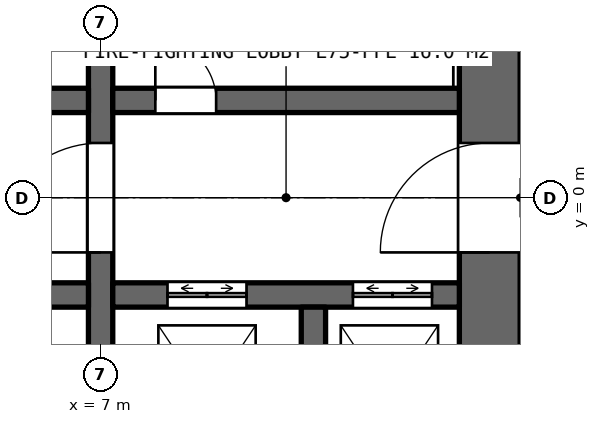
"""IFC4 building model, lengths in metres.
Left out: names, types, materials, properties, quantities, classifications, styles, units other than length and angle.
Written with IfcOpenShell. Run it as: python <this file> out.ifc"""

import sys

from ifc_helpers import new_model, si_unit, direction, frame, frame_2d, origin, place, context, subcontext, project, spatial, rectangle, extrude, element, fill, save


model = new_model("IFC4")
c1 = context("Model", 3, precision=1e-05, world=origin(), true_north=direction((0.0, 1.0)))
c2 = subcontext(c1, "Body", "Model", "MODEL_VIEW")
j1 = project(units=[si_unit("LENGTHUNIT", "METRE"), si_unit("PLANEANGLEUNIT", "RADIAN")], contexts=[c1])
p1 = place(None, origin())
s1 = spatial("IfcSite", under=j1, at=p1, CompositionType="ELEMENT")
p2 = place(p1, origin())
s2 = spatial("IfcBuilding", under=s1, at=p2, CompositionType="ELEMENT")
p3 = place(p2, frame((0.0, 0.0, 334.2)))
s3 = spatial("IfcBuildingStorey", under=s2, at=p3, CompositionType="ELEMENT", Elevation=334.2)
p4 = place(p3, frame((13.4, -8.9, 0.0), z_axis=(0.0, 0.0, 1.0), x_axis=(0.0, 1.0, 0.0)))
e1 = element("IfcWall", 1, at=p4, inside=s3, PredefinedType="SHEAR", context=c2, shape_type="SweptSolid", body=[
    extrude(rectangle(XDim=17.8, YDim=1.0, at=frame_2d((8.9, 0.0))), origin(), (0.0, 0.0, 1.0), 5.0),
])
p5 = place(p4, frame((8.0, 0.0, 0.0)))
e2 = element("IfcOpeningElement", 2, at=p5, cuts=e1, PredefinedType="OPENING", context=c2, shape_type="SweptSolid", body=[
    extrude(rectangle(XDim=1.8, YDim=2.4, at=frame_2d((0.9, 1.2))), frame((0.0, 0.51, 0.0), z_axis=(0.0, -1.0, 0.0), x_axis=(1.0, 0.0, 0.0)), (0.0, 0.0, 1.0), 1.02),
])
p6 = place(p3, frame((7.0, -8.9, 0.0), z_axis=(0.0, 0.0, 1.0), x_axis=(0.0, 1.0, 0.0)))
e3 = element("IfcWall", 3, at=p6, inside=s3, PredefinedType="SHEAR", context=c2, shape_type="SweptSolid", body=[
    extrude(rectangle(XDim=17.8, YDim=0.4, at=frame_2d((8.9, 0.0))), origin(), (0.0, 0.0, 1.0), 5.0),
])
p7 = place(p6, frame((8.0, 0.0, 0.0)))
e4 = element("IfcOpeningElement", 4, at=p7, cuts=e3, PredefinedType="OPENING", context=c2, shape_type="SweptSolid", body=[
    extrude(rectangle(XDim=1.8, YDim=2.4, at=frame_2d((0.9, 1.2))), frame((0.0, 0.21, 0.0), z_axis=(0.0, -1.0, 0.0), x_axis=(1.0, 0.0, 0.0)), (0.0, 0.0, 1.0), 0.42),
])
p8 = place(p3, frame((-6.8, 1.6, 0.0), z_axis=(0.0, 0.0, 1.0), x_axis=(1.0, 0.0, 0.0)))
e5 = element("IfcWall", 5, at=p8, inside=s3, PredefinedType="SHEAR", context=c2, shape_type="SweptSolid", body=[
    extrude(rectangle(XDim=13.6, YDim=0.4, at=frame_2d((6.8, 0.0))), origin(), (0.0, 0.0, 1.0), 5.0),
])
p9 = place(p8, frame((2.365, 0.0, 0.0)))
e6 = element("IfcOpeningElement", 6, at=p9, cuts=e5, PredefinedType="OPENING", context=c2, shape_type="SweptSolid", body=[
    extrude(rectangle(XDim=1.0, YDim=2.4, at=frame_2d((0.5, 1.2))), frame((0.0, 0.21, 0.0), z_axis=(0.0, -1.0, 0.0), x_axis=(1.0, 0.0, 0.0)), (0.0, 0.0, 1.0), 0.42),
])
p10 = place(p8, frame((7.835, 0.0, 0.0)))
e7 = element("IfcOpeningElement", 7, at=p10, cuts=e5, PredefinedType="OPENING", context=c2, shape_type="SweptSolid", body=[
    extrude(rectangle(XDim=1.0, YDim=2.4, at=frame_2d((0.5, 1.2))), frame((0.0, 0.21, 0.0), z_axis=(0.0, -1.0, 0.0), x_axis=(1.0, 0.0, 0.0)), (0.0, 0.0, 1.0), 0.42),
])
p11 = place(p8, frame((11.95, 0.0, 0.0)))
e8 = element("IfcOpeningElement", 8, at=p11, cuts=e5, PredefinedType="OPENING", context=c2, shape_type="SweptSolid", body=[
    extrude(rectangle(XDim=0.9, YDim=2.4, at=frame_2d((0.45, 1.2))), frame((0.0, 0.21, 0.0), z_axis=(0.0, -1.0, 0.0), x_axis=(1.0, 0.0, 0.0)), (0.0, 0.0, 1.0), 0.42),
])
p12 = place(p3, frame((-6.8, -1.6, 0.0), z_axis=(0.0, 0.0, 1.0), x_axis=(1.0, 0.0, 0.0)))
e9 = element("IfcWall", 9, at=p12, inside=s3, PredefinedType="SHEAR", context=c2, shape_type="SweptSolid", body=[
    extrude(rectangle(XDim=13.6, YDim=0.4, at=frame_2d((6.8, 0.0))), origin(), (0.0, 0.0, 1.0), 5.0),
])
p13 = place(p12, frame((11.95, 0.0, 0.0)))
e10 = element("IfcOpeningElement", 10, at=p13, cuts=e9, PredefinedType="OPENING", context=c2, shape_type="SweptSolid", body=[
    extrude(rectangle(XDim=0.9, YDim=2.4, at=frame_2d((0.45, 1.2))), frame((0.0, 0.21, 0.0), z_axis=(0.0, -1.0, 0.0), x_axis=(1.0, 0.0, 0.0)), (0.0, 0.0, 1.0), 0.42),
])
p14 = place(p12, frame((4.5, 0.0, 0.0)))
e11 = element("IfcOpeningElement", 11, at=p14, cuts=e9, PredefinedType="OPENING", context=c2, shape_type="SweptSolid", body=[
    extrude(rectangle(XDim=1.8, YDim=2.4, at=frame_2d((0.9, 1.2))), frame((0.0, 0.21, 0.0), z_axis=(0.0, -1.0, 0.0), x_axis=(1.0, 0.0, 0.0)), (0.0, 0.0, 1.0), 0.42),
])
p15 = place(p3, frame((7.2, 1.6, 0.0), z_axis=(0.0, 0.0, 1.0), x_axis=(1.0, 0.0, 0.0)))
e12 = element("IfcWall", 12, at=p15, inside=s3, PredefinedType="SHEAR", context=c2, shape_type="SweptSolid", body=[
    extrude(rectangle(XDim=5.7, YDim=0.4, at=frame_2d((2.85, 0.0))), origin(), (0.0, 0.0, 1.0), 5.0),
])
p16 = place(p15, frame((0.7, 0.0, 0.0)))
e13 = element("IfcOpeningElement", 13, at=p16, cuts=e12, PredefinedType="OPENING", context=c2, shape_type="SweptSolid", body=[
    extrude(rectangle(XDim=1.0, YDim=2.4, at=frame_2d((0.5, 1.2))), frame((0.0, 0.21, 0.0), z_axis=(0.0, -1.0, 0.0), x_axis=(1.0, 0.0, 0.0)), (0.0, 0.0, 1.0), 0.42),
])
p17 = place(p3, frame((7.2, -1.6, 0.0), z_axis=(0.0, 0.0, 1.0), x_axis=(1.0, 0.0, 0.0)))
e14 = element("IfcWall", 14, at=p17, inside=s3, PredefinedType="SHEAR", context=c2, shape_type="SweptSolid", body=[
    extrude(rectangle(XDim=5.7, YDim=0.4, at=frame_2d((2.85, 0.0))), origin(), (0.0, 0.0, 1.0), 5.0),
])
p18 = place(p17, frame((0.9, 0.0, 0.0)))
e15 = element("IfcOpeningElement", 15, at=p18, cuts=e14, PredefinedType="OPENING", context=c2, shape_type="SweptSolid", body=[
    extrude(rectangle(XDim=1.3, YDim=2.4, at=frame_2d((0.65, 1.2))), frame((0.0, 0.21, 0.0), z_axis=(0.0, -1.0, 0.0), x_axis=(1.0, 0.0, 0.0)), (0.0, 0.0, 1.0), 0.42),
])
p19 = place(p17, frame((3.95, 0.0, 0.0)))
e16 = element("IfcOpeningElement", 16, at=p19, cuts=e14, PredefinedType="OPENING", context=c2, shape_type="SweptSolid", body=[
    extrude(rectangle(XDim=1.3, YDim=2.4, at=frame_2d((0.65, 1.2))), frame((0.0, 0.21, 0.0), z_axis=(0.0, -1.0, 0.0), x_axis=(1.0, 0.0, 0.0)), (0.0, 0.0, 1.0), 0.42),
])
p20 = place(p3, frame((10.5, -4.8, 0.0), z_axis=(0.0, 0.0, 1.0), x_axis=(0.0, 1.0, 0.0)))
e17 = element("IfcWall", 17, at=p20, inside=s3, PredefinedType="SHEAR", context=c2, shape_type="SweptSolid", body=[
    extrude(rectangle(XDim=3.0, YDim=0.4, at=frame_2d((1.5, 0.0))), origin(), (0.0, 0.0, 1.0), 5.0),
])
p21 = place(p5, origin())
e18 = element("IfcDoor", 18, at=p21, inside=s3, OperationType="DOUBLE_DOOR_SINGLE_SWING", PredefinedType="DOOR", context=c2, shape_type="SweptSolid", body=[
    extrude(rectangle(XDim=1.8, YDim=2.4, at=frame_2d((0.9, 1.2))), frame((0.0, 0.025, 0.0), z_axis=(0.0, -1.0, 0.0), x_axis=(1.0, 0.0, 0.0)), (0.0, 0.0, 1.0), 0.05),
])
fill(e2, e18)
p22 = place(p7, origin())
e19 = element("IfcDoor", 19, at=p22, inside=s3, OperationType="DOUBLE_DOOR_SINGLE_SWING", PredefinedType="DOOR", context=c2, shape_type="SweptSolid", body=[
    extrude(rectangle(XDim=1.8, YDim=2.4, at=frame_2d((0.9, 1.2))), frame((0.0, 0.025, 0.0), z_axis=(0.0, -1.0, 0.0), x_axis=(1.0, 0.0, 0.0)), (0.0, 0.0, 1.0), 0.05),
])
fill(e4, e19)
p23 = place(p16, origin())
e20 = element("IfcDoor", 20, at=p23, inside=s3, OperationType="SINGLE_SWING_LEFT", PredefinedType="DOOR", context=c2, shape_type="SweptSolid", body=[
    extrude(rectangle(XDim=1.0, YDim=2.4, at=frame_2d((0.5, 1.2))), frame((0.0, 0.025, 0.0), z_axis=(0.0, -1.0, 0.0), x_axis=(1.0, 0.0, 0.0)), (0.0, 0.0, 1.0), 0.05),
])
fill(e13, e20)
p24 = place(p18, origin())
e21 = element("IfcDoor", 21, at=p24, inside=s3, OperationType="DOUBLE_DOOR_SLIDING", PredefinedType="DOOR", context=c2, shape_type="SweptSolid", body=[
    extrude(rectangle(XDim=1.3, YDim=2.4, at=frame_2d((0.65, 1.2))), frame((0.0, 0.025, 0.0), z_axis=(0.0, -1.0, 0.0), x_axis=(1.0, 0.0, 0.0)), (0.0, 0.0, 1.0), 0.05),
])
fill(e15, e21)
p25 = place(p19, origin())
e22 = element("IfcDoor", 22, at=p25, inside=s3, OperationType="DOUBLE_DOOR_SLIDING", PredefinedType="DOOR", context=c2, shape_type="SweptSolid", body=[
    extrude(rectangle(XDim=1.3, YDim=2.4, at=frame_2d((0.65, 1.2))), frame((0.0, 0.025, 0.0), z_axis=(0.0, -1.0, 0.0), x_axis=(1.0, 0.0, 0.0)), (0.0, 0.0, 1.0), 0.05),
])
fill(e16, e22)
save(model, sys.argv[1])
